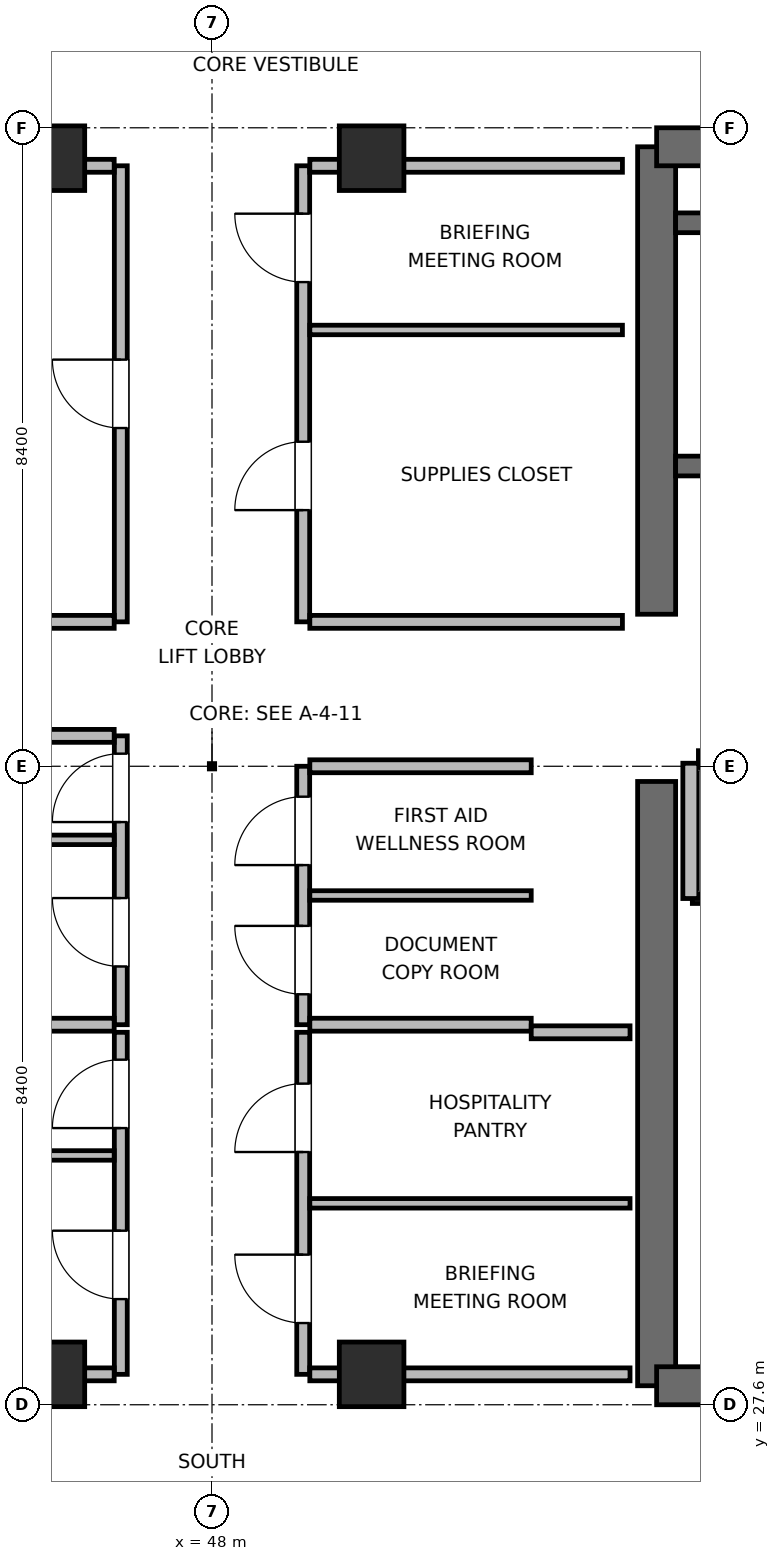
"""IFC4 building model, lengths in metres.
Left out: names, types, materials, properties, quantities, classifications, styles, units other than length and angle.
Written with IfcOpenShell. Run it as: python <this file> out.ifc"""

import sys

from ifc_helpers import new_model, si_unit, direction, frame, frame_2d, origin, origin_2d, place, context, subcontext, project, spatial, rectangle, extrude, element, fill, save


model = new_model("IFC4")
c1 = context("Model", 3, precision=1e-05, world=origin(), true_north=direction((0.0, 1.0)))
c2 = subcontext(c1, "Body", "Model", "MODEL_VIEW")
j1 = project(units=[si_unit("LENGTHUNIT", "METRE"), si_unit("PLANEANGLEUNIT", "RADIAN")], contexts=[c1])
p1 = place(None, origin())
s1 = spatial("IfcSite", under=j1, at=p1, CompositionType="ELEMENT")
p2 = place(p1, origin())
s2 = spatial("IfcBuilding", under=s1, at=p2, CompositionType="ELEMENT")
p3 = place(p2, frame((0.0, 0.0, 290.1)))
s3 = spatial("IfcBuildingStorey", under=s2, at=p3, CompositionType="ELEMENT", Elevation=290.1)
p4 = place(p3, frame((53.85, 27.85, 0.0), z_axis=(0.0, 0.0, 1.0), x_axis=(0.0, 1.0, 0.0)))
e1 = element("IfcWall", 1, at=p4, inside=s3, PredefinedType="SHEAR", context=c2, shape_type="SweptSolid", body=[
    extrude(rectangle(XDim=7.95, YDim=0.5, at=frame_2d((3.975, 0.0))), origin(), (0.0, 0.0, 1.0), 3.9),
])
p5 = place(p3, frame((53.85, 38.0, 0.0), z_axis=(0.0, 0.0, 1.0), x_axis=(0.0, 1.0, 0.0)))
e2 = element("IfcWall", 2, at=p5, inside=s3, PredefinedType="SHEAR", context=c2, shape_type="SweptSolid", body=[
    extrude(rectangle(XDim=6.15, YDim=0.5, at=frame_2d((3.075, 0.0))), origin(), (0.0, 0.0, 1.0), 3.9),
])
p6 = place(p3, frame((53.85, 27.85, 0.0), z_axis=(0.0, 0.0, 1.0), x_axis=(1.0, 0.0, 0.0)))
e3 = element("IfcWall", 3, at=p6, inside=s3, PredefinedType="SHEAR", context=c2, shape_type="SweptSolid", body=[
    extrude(rectangle(XDim=9.5, YDim=0.5, at=frame_2d((4.75, 0.0))), origin(), (0.0, 0.0, 1.0), 3.9),
])
p7 = place(p6, frame((4.025, 0.0, 0.0)))
e4 = element("IfcOpeningElement", 4, at=p7, cuts=e3, PredefinedType="OPENING", context=c2, shape_type="SweptSolid", body=[
    extrude(rectangle(XDim=1.05, YDim=2.04, at=frame_2d((0.525, 1.02))), frame((0.0, 0.26, 0.0), z_axis=(0.0, -1.0, 0.0), x_axis=(1.0, 0.0, 0.0)), (0.0, 0.0, 1.0), 0.52),
])
p8 = place(p3, frame((53.85, 44.15, 0.0), z_axis=(0.0, 0.0, 1.0), x_axis=(1.0, 0.0, 0.0)))
e5 = element("IfcWall", 5, at=p8, inside=s3, PredefinedType="SHEAR", context=c2, shape_type="SweptSolid", body=[
    extrude(rectangle(XDim=9.5, YDim=0.5, at=frame_2d((4.75, 0.0))), origin(), (0.0, 0.0, 1.0), 3.9),
])
p9 = place(p3, frame((54.1, 39.95, 0.0), z_axis=(0.0, 0.0, 1.0), x_axis=(1.0, 0.0, 0.0)))
e6 = element("IfcWall", 6, at=p9, inside=s3, PredefinedType="SHEAR", context=c2, shape_type="SweptSolid", body=[
    extrude(rectangle(XDim=9.0, YDim=0.26, at=frame_2d((4.5, 0.0))), origin(), (0.0, 0.0, 1.0), 3.9),
])
p10 = place(p9, frame((1.1, 0.0, 0.0)))
e7 = element("IfcOpeningElement", 7, at=p10, cuts=e6, PredefinedType="OPENING", context=c2, shape_type="SweptSolid", body=[
    extrude(rectangle(XDim=1.0, YDim=2.04, at=frame_2d((0.5, 1.02))), frame((0.0, 0.14, 0.0), z_axis=(0.0, -1.0, 0.0), x_axis=(1.0, 0.0, 0.0)), (0.0, 0.0, 1.0), 0.28),
])
p11 = place(p3, frame((54.1, 43.15, 0.0), z_axis=(0.0, 0.0, 1.0), x_axis=(1.0, 0.0, 0.0)))
e8 = element("IfcWall", 8, at=p11, inside=s3, PredefinedType="SHEAR", context=c2, shape_type="SweptSolid", body=[
    extrude(rectangle(XDim=9.0, YDim=0.26, at=frame_2d((4.5, 0.0))), origin(), (0.0, 0.0, 1.0), 3.9),
])
for number, where, z_axis, x_axis in (
    (9, (45.9, 28.0, 0.0), (0.0, 0.0, 1.0), (1.0, 0.0, 0.0)),
    (10, (50.1, 28.0, 0.0), (0.0, 0.0, 1.0), (1.0, 0.0, 0.0)),
    (11, (45.9, 44.0, 0.0), (0.0, 0.0, 1.0), (1.0, 0.0, 0.0)),
    (12, (50.1, 44.0, 0.0), (0.0, 0.0, 1.0), (1.0, 0.0, 0.0)),
):
    element("IfcColumn", number, at=place(p3, frame(where, z_axis=z_axis, x_axis=x_axis)), inside=s3, PredefinedType="COLUMN", context=c2, shape_type="SweptSolid", body=[
        extrude(rectangle(XDim=0.85, YDim=0.85, at=origin_2d()), origin(), (0.0, 0.0, 1.0), 3.9),
    ])
p12 = place(p3, frame((54.32, 34.3, 0.0), z_axis=(0.0, 0.0, 1.0), x_axis=(1.0, 0.0, 0.0)))
e13 = element("IfcWall", 13, at=p12, inside=s3, PredefinedType="PARTITIONING", context=c2, shape_type="SweptSolid", body=[
    extrude(rectangle(XDim=3.48, YDim=0.21, at=frame_2d((1.74, 0.0))), origin(), (0.0, 0.0, 1.0), 3.68),
])
p13 = place(p3, frame((54.4, 36.1, 0.0), z_axis=(0.0, 0.0, 1.0), x_axis=(1.0, 0.0, 0.0)))
e14 = element("IfcWall", 14, at=p13, inside=s3, PredefinedType="PARTITIONING", context=c2, shape_type="SweptSolid", body=[
    extrude(rectangle(XDim=2.1, YDim=0.21, at=frame_2d((1.05, 0.0))), origin(), (0.0, 0.0, 1.0), 3.68),
])
p14 = place(p13, frame((0.5, 0.0, 0.0)))
e15 = element("IfcOpeningElement", 15, at=p14, cuts=e14, PredefinedType="OPENING", context=c2, shape_type="SweptSolid", body=[
    extrude(rectangle(XDim=1.1, YDim=2.04, at=frame_2d((0.55, 1.02))), frame((0.0, 0.115, 0.0), z_axis=(0.0, -1.0, 0.0), x_axis=(1.0, 0.0, 0.0)), (0.0, 0.0, 1.0), 0.23),
])
p15 = place(p3, frame((54.3, 34.26, 0.0), z_axis=(0.0, 0.0, 1.0), x_axis=(0.0, 1.0, 0.0)))
e16 = element("IfcWall", 16, at=p15, inside=s3, PredefinedType="PARTITIONING", context=c2, shape_type="SweptSolid", body=[
    extrude(rectangle(XDim=1.78, YDim=0.21, at=frame_2d((0.89, 0.0))), origin(), (0.0, 0.0, 1.0), 3.68),
])
p16 = place(p3, frame((46.8, 32.6, 0.0), z_axis=(0.0, 0.0, 1.0), x_axis=(0.0, 1.0, 0.0)))
e17 = element("IfcWall", 17, at=p16, inside=s3, PredefinedType="PARTITIONING", context=c2, shape_type="SweptSolid", body=[
    extrude(rectangle(XDim=3.8, YDim=0.17, at=frame_2d((1.9, 0.0))), origin(), (0.0, 0.0, 1.0), 3.68),
])
p17 = place(p16, frame((0.766, 0.0, 0.0)))
e18 = element("IfcOpeningElement", 18, at=p17, cuts=e17, PredefinedType="OPENING", context=c2, shape_type="SweptSolid", body=[
    extrude(rectangle(XDim=0.9, YDim=2.02, at=frame_2d((0.45, 1.01))), frame((0.0, 0.095, 0.0), z_axis=(0.0, -1.0, 0.0), x_axis=(1.0, 0.0, 0.0)), (0.0, 0.0, 1.0), 0.19),
])
p18 = place(p16, frame((2.666, 0.0, 0.0)))
e19 = element("IfcOpeningElement", 19, at=p18, cuts=e17, PredefinedType="OPENING", context=c2, shape_type="SweptSolid", body=[
    extrude(rectangle(XDim=0.9, YDim=2.02, at=frame_2d((0.45, 1.01))), frame((0.0, 0.095, 0.0), z_axis=(0.0, -1.0, 0.0), x_axis=(1.0, 0.0, 0.0)), (0.0, 0.0, 1.0), 0.19),
])
for number, where, z_axis, x_axis in (
    (20, (43.8, 32.6, 0.0), (0.0, 0.0, 1.0), (1.0, 0.0, 0.0)),
    (21, (43.8, 36.4, 0.0), (0.0, 0.0, 1.0), (1.0, 0.0, 0.0)),
):
    element("IfcWall", number, at=place(p3, frame(where, z_axis=z_axis, x_axis=x_axis)), inside=s3, PredefinedType="PARTITIONING", context=c2, shape_type="SweptSolid", body=[
        extrude(rectangle(XDim=2.913, YDim=0.17, at=frame_2d((1.457, 0.0))), origin(), (0.0, 0.0, 1.0), 3.68),
    ])
p19 = place(p3, frame((43.8, 35.032, 0.0), z_axis=(0.0, 0.0, 1.0), x_axis=(1.0, 0.0, 0.0)))
e22 = element("IfcWall", 22, at=p19, inside=s3, PredefinedType="PARTITIONING", context=c2, shape_type="SweptSolid", body=[
    extrude(rectangle(XDim=2.913, YDim=0.125, at=frame_2d((1.457, 0.0))), origin(), (0.0, 0.0, 1.0), 3.68),
])
p20 = place(p3, frame((49.2, 32.6, 0.0), z_axis=(0.0, 0.0, 1.0), x_axis=(0.0, 1.0, 0.0)))
e23 = element("IfcWall", 23, at=p20, inside=s3, PredefinedType="PARTITIONING", context=c2, shape_type="SweptSolid", body=[
    extrude(rectangle(XDim=3.4, YDim=0.17, at=frame_2d((1.7, 0.0))), origin(), (0.0, 0.0, 1.0), 3.68),
])
p21 = place(p20, frame((0.4, 0.0, 0.0)))
e24 = element("IfcOpeningElement", 24, at=p21, cuts=e23, PredefinedType="OPENING", context=c2, shape_type="SweptSolid", body=[
    extrude(rectangle(XDim=0.9, YDim=2.02, at=frame_2d((0.45, 1.01))), frame((0.0, 0.095, 0.0), z_axis=(0.0, -1.0, 0.0), x_axis=(1.0, 0.0, 0.0)), (0.0, 0.0, 1.0), 0.19),
])
p22 = place(p20, frame((2.1, 0.0, 0.0)))
e25 = element("IfcOpeningElement", 25, at=p22, cuts=e23, PredefinedType="OPENING", context=c2, shape_type="SweptSolid", body=[
    extrude(rectangle(XDim=0.9, YDim=2.02, at=frame_2d((0.45, 1.01))), frame((0.0, 0.095, 0.0), z_axis=(0.0, -1.0, 0.0), x_axis=(1.0, 0.0, 0.0)), (0.0, 0.0, 1.0), 0.19),
])
for number, where, z_axis, x_axis in (
    (26, (49.287, 32.6, 0.0), (0.0, 0.0, 1.0), (1.0, 0.0, 0.0)),
    (27, (49.287, 36.0, 0.0), (0.0, 0.0, 1.0), (1.0, 0.0, 0.0)),
):
    element("IfcWall", number, at=place(p3, frame(where, z_axis=z_axis, x_axis=x_axis)), inside=s3, PredefinedType="PARTITIONING", context=c2, shape_type="SweptSolid", body=[
        extrude(rectangle(XDim=2.913, YDim=0.17, at=frame_2d((1.457, 0.0))), origin(), (0.0, 0.0, 1.0), 3.68),
    ])
p23 = place(p3, frame((49.287, 34.3, 0.0), z_axis=(0.0, 0.0, 1.0), x_axis=(1.0, 0.0, 0.0)))
e28 = element("IfcWall", 28, at=p23, inside=s3, PredefinedType="PARTITIONING", context=c2, shape_type="SweptSolid", body=[
    extrude(rectangle(XDim=2.913, YDim=0.125, at=frame_2d((1.457, 0.0))), origin(), (0.0, 0.0, 1.0), 3.68),
])
p24 = place(p3, frame((46.8, 28.0, 0.0), z_axis=(0.0, 0.0, 1.0), x_axis=(0.0, 1.0, 0.0)))
e29 = element("IfcWall", 29, at=p24, inside=s3, PredefinedType="PARTITIONING", context=c2, shape_type="SweptSolid", body=[
    extrude(rectangle(XDim=4.5, YDim=0.17, at=frame_2d((2.25, 0.0))), origin(), (0.0, 0.0, 1.0), 3.68),
])
p25 = place(p24, frame((0.99, 0.0, 0.0)))
e30 = element("IfcOpeningElement", 30, at=p25, cuts=e29, PredefinedType="OPENING", context=c2, shape_type="SweptSolid", body=[
    extrude(rectangle(XDim=0.9, YDim=2.02, at=frame_2d((0.45, 1.01))), frame((0.0, 0.095, 0.0), z_axis=(0.0, -1.0, 0.0), x_axis=(1.0, 0.0, 0.0)), (0.0, 0.0, 1.0), 0.19),
])
p26 = place(p24, frame((3.24, 0.0, 0.0)))
e31 = element("IfcOpeningElement", 31, at=p26, cuts=e29, PredefinedType="OPENING", context=c2, shape_type="SweptSolid", body=[
    extrude(rectangle(XDim=0.9, YDim=2.02, at=frame_2d((0.45, 1.01))), frame((0.0, 0.095, 0.0), z_axis=(0.0, -1.0, 0.0), x_axis=(1.0, 0.0, 0.0)), (0.0, 0.0, 1.0), 0.19),
])
p27 = place(p3, frame((42.5, 28.0, 0.0), z_axis=(0.0, 0.0, 1.0), x_axis=(1.0, 0.0, 0.0)))
e32 = element("IfcWall", 32, at=p27, inside=s3, PredefinedType="PARTITIONING", context=c2, shape_type="SweptSolid", body=[
    extrude(rectangle(XDim=4.213, YDim=0.17, at=frame_2d((2.106, 0.0))), origin(), (0.0, 0.0, 1.0), 2.765),
])
p28 = place(p3, frame((42.5, 30.88, 0.0), z_axis=(0.0, 0.0, 1.0), x_axis=(1.0, 0.0, 0.0)))
e33 = element("IfcWall", 33, at=p28, inside=s3, PredefinedType="PARTITIONING", context=c2, shape_type="SweptSolid", body=[
    extrude(rectangle(XDim=4.213, YDim=0.125, at=frame_2d((2.106, 0.0))), origin(), (0.0, 0.0, 1.0), 3.68),
])
p29 = place(p3, frame((49.2, 28.0, 0.0), z_axis=(0.0, 0.0, 1.0), x_axis=(0.0, 1.0, 0.0)))
e34 = element("IfcWall", 34, at=p29, inside=s3, PredefinedType="PARTITIONING", context=c2, shape_type="SweptSolid", body=[
    extrude(rectangle(XDim=4.5, YDim=0.17, at=frame_2d((2.25, 0.0))), origin(), (0.0, 0.0, 1.0), 3.68),
])
p30 = place(p29, frame((0.675, 0.0, 0.0)))
e35 = element("IfcOpeningElement", 35, at=p30, cuts=e34, PredefinedType="OPENING", context=c2, shape_type="SweptSolid", body=[
    extrude(rectangle(XDim=0.9, YDim=2.02, at=frame_2d((0.45, 1.01))), frame((0.0, 0.095, 0.0), z_axis=(0.0, -1.0, 0.0), x_axis=(1.0, 0.0, 0.0)), (0.0, 0.0, 1.0), 0.19),
])
p31 = place(p29, frame((2.925, 0.0, 0.0)))
e36 = element("IfcOpeningElement", 36, at=p31, cuts=e34, PredefinedType="OPENING", context=c2, shape_type="SweptSolid", body=[
    extrude(rectangle(XDim=0.9, YDim=2.02, at=frame_2d((0.45, 1.01))), frame((0.0, 0.095, 0.0), z_axis=(0.0, -1.0, 0.0), x_axis=(1.0, 0.0, 0.0)), (0.0, 0.0, 1.0), 0.19),
])
p32 = place(p3, frame((49.287, 28.0, 0.0), z_axis=(0.0, 0.0, 1.0), x_axis=(1.0, 0.0, 0.0)))
e37 = element("IfcWall", 37, at=p32, inside=s3, PredefinedType="PARTITIONING", context=c2, shape_type="SweptSolid", body=[
    extrude(rectangle(XDim=4.213, YDim=0.17, at=frame_2d((2.106, 0.0))), origin(), (0.0, 0.0, 1.0), 2.765),
])
p33 = place(p3, frame((52.2, 32.5, 0.0), z_axis=(0.0, 0.0, 1.0), x_axis=(1.0, 0.0, 0.0)))
e38 = element("IfcWall", 38, at=p33, inside=s3, PredefinedType="PARTITIONING", context=c2, shape_type="SweptSolid", body=[
    extrude(rectangle(XDim=1.3, YDim=0.17, at=frame_2d((0.65, 0.0))), origin(), (0.0, 0.0, 1.0), 3.68),
])
p34 = place(p3, frame((49.287, 30.25, 0.0), z_axis=(0.0, 0.0, 1.0), x_axis=(1.0, 0.0, 0.0)))
e39 = element("IfcWall", 39, at=p34, inside=s3, PredefinedType="PARTITIONING", context=c2, shape_type="SweptSolid", body=[
    extrude(rectangle(XDim=4.213, YDim=0.125, at=frame_2d((2.106, 0.0))), origin(), (0.0, 0.0, 1.0), 3.68),
])
p35 = place(p3, frame((46.8, 37.9, 0.0), z_axis=(0.0, 0.0, 1.0), x_axis=(0.0, 1.0, 0.0)))
e40 = element("IfcWall", 40, at=p35, inside=s3, PredefinedType="PARTITIONING", context=c2, shape_type="SweptSolid", body=[
    extrude(rectangle(XDim=6.0, YDim=0.17, at=frame_2d((3.0, 0.0))), origin(), (0.0, 0.0, 1.0), 3.68),
])
p36 = place(p35, frame((2.55, 0.0, 0.0)))
e41 = element("IfcOpeningElement", 41, at=p36, cuts=e40, PredefinedType="OPENING", context=c2, shape_type="SweptSolid", body=[
    extrude(rectangle(XDim=0.9, YDim=2.02, at=frame_2d((0.45, 1.01))), frame((0.0, 0.095, 0.0), z_axis=(0.0, -1.0, 0.0), x_axis=(1.0, 0.0, 0.0)), (0.0, 0.0, 1.0), 0.19),
])
p37 = place(p3, frame((42.5, 37.9, 0.0), z_axis=(0.0, 0.0, 1.0), x_axis=(1.0, 0.0, 0.0)))
e42 = element("IfcWall", 42, at=p37, inside=s3, PredefinedType="PARTITIONING", context=c2, shape_type="SweptSolid", body=[
    extrude(rectangle(XDim=4.213, YDim=0.17, at=frame_2d((2.106, 0.0))), origin(), (0.0, 0.0, 1.0), 3.68),
])
p38 = place(p3, frame((42.5, 43.9, 0.0), z_axis=(0.0, 0.0, 1.0), x_axis=(1.0, 0.0, 0.0)))
e43 = element("IfcWall", 43, at=p38, inside=s3, PredefinedType="PARTITIONING", context=c2, shape_type="SweptSolid", body=[
    extrude(rectangle(XDim=4.213, YDim=0.17, at=frame_2d((2.106, 0.0))), origin(), (0.0, 0.0, 1.0), 2.765),
])
p39 = place(p3, frame((49.2, 37.9, 0.0), z_axis=(0.0, 0.0, 1.0), x_axis=(0.0, 1.0, 0.0)))
e44 = element("IfcWall", 44, at=p39, inside=s3, PredefinedType="PARTITIONING", context=c2, shape_type="SweptSolid", body=[
    extrude(rectangle(XDim=6.0, YDim=0.17, at=frame_2d((3.0, 0.0))), origin(), (0.0, 0.0, 1.0), 3.68),
])
p40 = place(p39, frame((1.47, 0.0, 0.0)))
e45 = element("IfcOpeningElement", 45, at=p40, cuts=e44, PredefinedType="OPENING", context=c2, shape_type="SweptSolid", body=[
    extrude(rectangle(XDim=0.9, YDim=2.02, at=frame_2d((0.45, 1.01))), frame((0.0, 0.095, 0.0), z_axis=(0.0, -1.0, 0.0), x_axis=(1.0, 0.0, 0.0)), (0.0, 0.0, 1.0), 0.19),
])
p41 = place(p39, frame((4.47, 0.0, 0.0)))
e46 = element("IfcOpeningElement", 46, at=p41, cuts=e44, PredefinedType="OPENING", context=c2, shape_type="SweptSolid", body=[
    extrude(rectangle(XDim=0.9, YDim=2.02, at=frame_2d((0.45, 1.01))), frame((0.0, 0.095, 0.0), z_axis=(0.0, -1.0, 0.0), x_axis=(1.0, 0.0, 0.0)), (0.0, 0.0, 1.0), 0.19),
])
p42 = place(p3, frame((49.287, 37.9, 0.0), z_axis=(0.0, 0.0, 1.0), x_axis=(1.0, 0.0, 0.0)))
e47 = element("IfcWall", 47, at=p42, inside=s3, PredefinedType="PARTITIONING", context=c2, shape_type="SweptSolid", body=[
    extrude(rectangle(XDim=4.113, YDim=0.17, at=frame_2d((2.056, 0.0))), origin(), (0.0, 0.0, 1.0), 3.68),
])
p43 = place(p3, frame((49.287, 43.9, 0.0), z_axis=(0.0, 0.0, 1.0), x_axis=(1.0, 0.0, 0.0)))
e48 = element("IfcWall", 48, at=p43, inside=s3, PredefinedType="PARTITIONING", context=c2, shape_type="SweptSolid", body=[
    extrude(rectangle(XDim=4.113, YDim=0.17, at=frame_2d((2.056, 0.0))), origin(), (0.0, 0.0, 1.0), 2.765),
])
p44 = place(p3, frame((49.287, 41.74, 0.0), z_axis=(0.0, 0.0, 1.0), x_axis=(1.0, 0.0, 0.0)))
e49 = element("IfcWall", 49, at=p44, inside=s3, PredefinedType="PARTITIONING", context=c2, shape_type="SweptSolid", body=[
    extrude(rectangle(XDim=4.113, YDim=0.125, at=frame_2d((2.056, 0.0))), origin(), (0.0, 0.0, 1.0), 3.68),
])
p45 = place(p17, origin())
e50 = element("IfcDoor", 50, at=p45, inside=s3, OperationType="SINGLE_SWING_RIGHT", PredefinedType="DOOR", context=c2, shape_type="SweptSolid", body=[
    extrude(rectangle(XDim=0.9, YDim=2.02, at=frame_2d((0.45, 1.01))), frame((0.0, 0.025, 0.0), z_axis=(0.0, -1.0, 0.0), x_axis=(1.0, 0.0, 0.0)), (0.0, 0.0, 1.0), 0.05),
])
fill(e18, e50)
p46 = place(p18, origin())
e51 = element("IfcDoor", 51, at=p46, inside=s3, OperationType="SINGLE_SWING_LEFT", PredefinedType="DOOR", context=c2, shape_type="SweptSolid", body=[
    extrude(rectangle(XDim=0.9, YDim=2.02, at=frame_2d((0.45, 1.01))), frame((0.0, 0.025, 0.0), z_axis=(0.0, -1.0, 0.0), x_axis=(1.0, 0.0, 0.0)), (0.0, 0.0, 1.0), 0.05),
])
fill(e19, e51)
p47 = place(p21, origin())
e52 = element("IfcDoor", 52, at=p47, inside=s3, OperationType="SINGLE_SWING_RIGHT", PredefinedType="DOOR", context=c2, shape_type="SweptSolid", body=[
    extrude(rectangle(XDim=0.9, YDim=2.02, at=frame_2d((0.45, 1.01))), frame((0.0, 0.025, 0.0), z_axis=(0.0, -1.0, 0.0), x_axis=(1.0, 0.0, 0.0)), (0.0, 0.0, 1.0), 0.05),
])
fill(e24, e52)
p48 = place(p22, origin())
e53 = element("IfcDoor", 53, at=p48, inside=s3, OperationType="SINGLE_SWING_LEFT", PredefinedType="DOOR", context=c2, shape_type="SweptSolid", body=[
    extrude(rectangle(XDim=0.9, YDim=2.02, at=frame_2d((0.45, 1.01))), frame((0.0, 0.025, 0.0), z_axis=(0.0, -1.0, 0.0), x_axis=(1.0, 0.0, 0.0)), (0.0, 0.0, 1.0), 0.05),
])
fill(e25, e53)
p49 = place(p25, origin())
e54 = element("IfcDoor", 54, at=p49, inside=s3, OperationType="SINGLE_SWING_RIGHT", PredefinedType="DOOR", context=c2, shape_type="SweptSolid", body=[
    extrude(rectangle(XDim=0.9, YDim=2.02, at=frame_2d((0.45, 1.01))), frame((0.0, 0.025, 0.0), z_axis=(0.0, -1.0, 0.0), x_axis=(1.0, 0.0, 0.0)), (0.0, 0.0, 1.0), 0.05),
])
fill(e30, e54)
p50 = place(p26, origin())
e55 = element("IfcDoor", 55, at=p50, inside=s3, OperationType="SINGLE_SWING_LEFT", PredefinedType="DOOR", context=c2, shape_type="SweptSolid", body=[
    extrude(rectangle(XDim=0.9, YDim=2.02, at=frame_2d((0.45, 1.01))), frame((0.0, 0.025, 0.0), z_axis=(0.0, -1.0, 0.0), x_axis=(1.0, 0.0, 0.0)), (0.0, 0.0, 1.0), 0.05),
])
fill(e31, e55)
p51 = place(p30, origin())
e56 = element("IfcDoor", 56, at=p51, inside=s3, OperationType="SINGLE_SWING_RIGHT", PredefinedType="DOOR", context=c2, shape_type="SweptSolid", body=[
    extrude(rectangle(XDim=0.9, YDim=2.02, at=frame_2d((0.45, 1.01))), frame((0.0, 0.025, 0.0), z_axis=(0.0, -1.0, 0.0), x_axis=(1.0, 0.0, 0.0)), (0.0, 0.0, 1.0), 0.05),
])
fill(e35, e56)
p52 = place(p31, origin())
e57 = element("IfcDoor", 57, at=p52, inside=s3, OperationType="SINGLE_SWING_LEFT", PredefinedType="DOOR", context=c2, shape_type="SweptSolid", body=[
    extrude(rectangle(XDim=0.9, YDim=2.02, at=frame_2d((0.45, 1.01))), frame((0.0, 0.025, 0.0), z_axis=(0.0, -1.0, 0.0), x_axis=(1.0, 0.0, 0.0)), (0.0, 0.0, 1.0), 0.05),
])
fill(e36, e57)
p53 = place(p36, origin())
e58 = element("IfcDoor", 58, at=p53, inside=s3, OperationType="SINGLE_SWING_RIGHT", PredefinedType="DOOR", context=c2, shape_type="SweptSolid", body=[
    extrude(rectangle(XDim=0.9, YDim=2.02, at=frame_2d((0.45, 1.01))), frame((0.0, 0.025, 0.0), z_axis=(0.0, -1.0, 0.0), x_axis=(1.0, 0.0, 0.0)), (0.0, 0.0, 1.0), 0.05),
])
fill(e41, e58)
p54 = place(p40, origin())
e59 = element("IfcDoor", 59, at=p54, inside=s3, OperationType="SINGLE_SWING_LEFT", PredefinedType="DOOR", context=c2, shape_type="SweptSolid", body=[
    extrude(rectangle(XDim=0.9, YDim=2.02, at=frame_2d((0.45, 1.01))), frame((0.0, 0.025, 0.0), z_axis=(0.0, -1.0, 0.0), x_axis=(1.0, 0.0, 0.0)), (0.0, 0.0, 1.0), 0.05),
])
fill(e45, e59)
p55 = place(p41, origin())
e60 = element("IfcDoor", 60, at=p55, inside=s3, OperationType="SINGLE_SWING_RIGHT", PredefinedType="DOOR", context=c2, shape_type="SweptSolid", body=[
    extrude(rectangle(XDim=0.9, YDim=2.02, at=frame_2d((0.45, 1.01))), frame((0.0, 0.025, 0.0), z_axis=(0.0, -1.0, 0.0), x_axis=(1.0, 0.0, 0.0)), (0.0, 0.0, 1.0), 0.05),
])
fill(e46, e60)
save(model, sys.argv[1])
